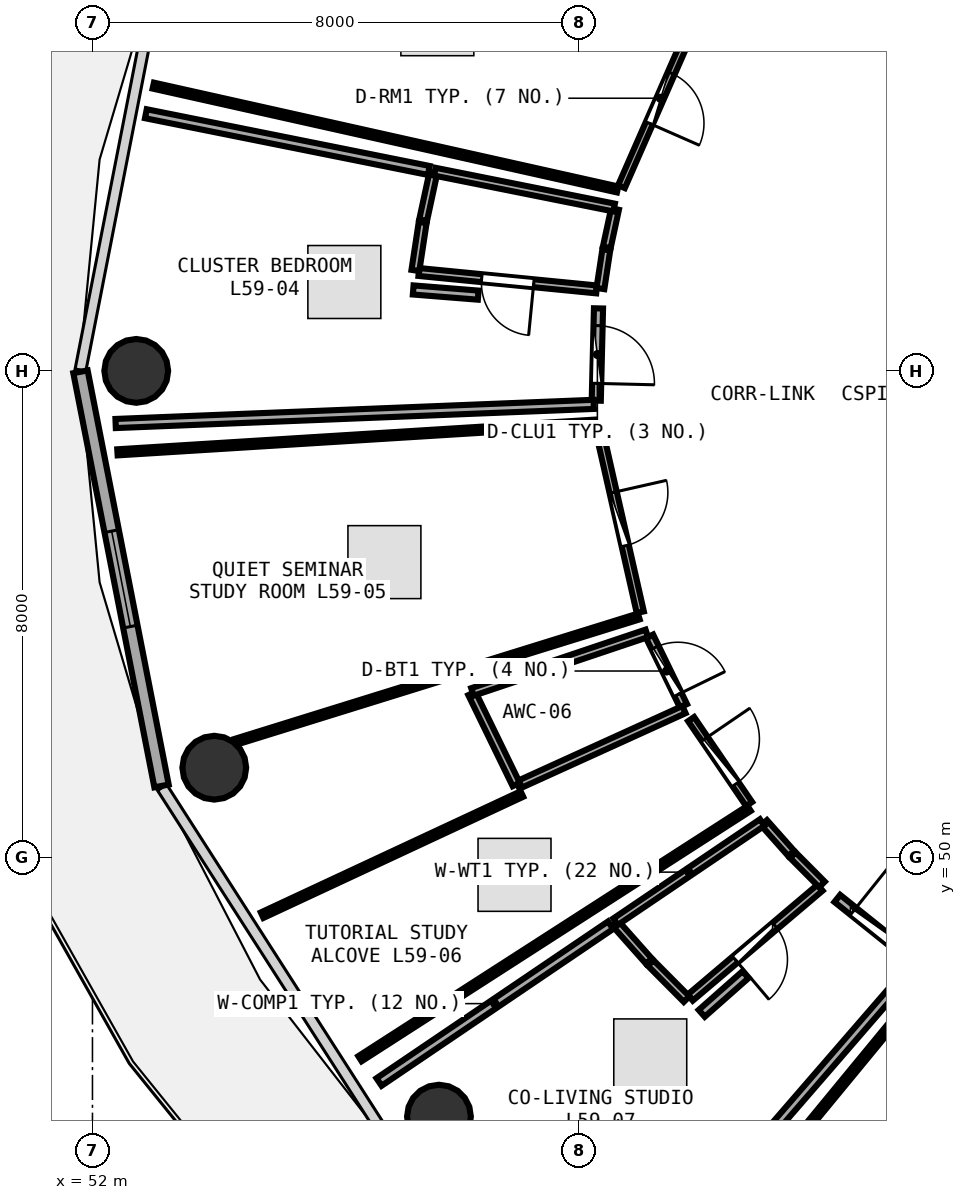
"""IFC4 building model, lengths in metres.
Left out: names, types, materials, properties, quantities, classifications, styles, units other than length and angle.
Written with IfcOpenShell. Run it as: python <this file> out.ifc"""

import sys

from ifc_helpers import new_model, si_unit, direction, frame, frame_2d, origin, origin_2d, place, context, subcontext, project, spatial, rectangle, circle, extrude, element, fill, save


model = new_model("IFC4")
c1 = context("Model", 3, precision=1e-05, world=origin(), true_north=direction((0.0, 1.0)))
c2 = subcontext(c1, "Body", "Model", "MODEL_VIEW")
j1 = project(units=[si_unit("LENGTHUNIT", "METRE"), si_unit("PLANEANGLEUNIT", "RADIAN")], contexts=[c1])
p1 = place(None, origin())
s1 = spatial("IfcSite", under=j1, at=p1, CompositionType="ELEMENT")
p2 = place(p1, origin())
s2 = spatial("IfcBuilding", under=s1, at=p2, CompositionType="ELEMENT")
p3 = place(p2, frame((0.0, 0.0, 230.7)))
s3 = spatial("IfcBuildingStorey", under=s2, at=p3, CompositionType="ELEMENT", Elevation=230.7)
for number, where, z_axis, x_axis in (
    (1, (52.72, 58.0, 0.0), (0.0, 0.0, 1.0), (1.0, 0.0, 0.0)),
    (2, (54.003, 51.474, 0.0), (0.0, 0.0, 1.0), (1.0, 0.0, 0.0)),
    (3, (57.698, 45.736, 0.0), (0.0, 0.0, 1.0), (1.0, 0.0, 0.0)),
):
    element("IfcColumn", number, at=place(p3, frame(where, z_axis=z_axis, x_axis=x_axis)), inside=s3, PredefinedType="COLUMN", context=c2, shape_type="SweptSolid", body=[
        extrude(circle(Radius=0.525, at=origin_2d()), origin(), (0.0, 0.0, 1.0), 3.75),
    ])
p4 = place(p3, frame((51.803, 57.985, 0.0), z_axis=(0.0, 0.0, 1.0), x_axis=(0.192069055673, -0.981381413036, 0.0)))
e4 = element("IfcWall", 4, at=p4, inside=s3, PredefinedType="SOLIDWALL", context=c2, shape_type="SweptSolid", body=[
    extrude(rectangle(XDim=6.94, YDim=0.24, at=frame_2d((3.47, 0.0))), origin(), (0.0, 0.0, 1.0), 3.475),
])
p5 = place(p4, frame((2.67, 0.0, 0.85)))
e5 = element("IfcOpeningElement", 5, at=p5, cuts=e4, PredefinedType="OPENING", context=c2, shape_type="SweptSolid", body=[
    extrude(rectangle(XDim=1.6, YDim=1.45, at=frame_2d((0.8, 0.725))), frame((0.0, 0.13, 0.0), z_axis=(0.0, -1.0, 0.0), x_axis=(1.0, 0.0, 0.0)), (0.0, 0.0, 1.0), 0.26),
])
p6 = place(p3, frame((61.976, 63.937, 0.0), z_axis=(0.0, 0.0, 1.0), x_axis=(-0.401802923717, -0.91572616567, 0.0)))
e6 = element("IfcWall", 6, at=p6, inside=s3, PredefinedType="PARTITIONING", context=c2, shape_type="SweptSolid", body=[
    extrude(rectangle(XDim=3.175, YDim=0.12, at=frame_2d((1.587, 0.0))), origin(), (0.0, 0.0, 1.0), 3.235),
])
p7 = place(p6, frame((1.137, 0.0, 0.0)))
e7 = element("IfcOpeningElement", 7, at=p7, cuts=e6, PredefinedType="OPENING", context=c2, shape_type="SweptSolid", body=[
    extrude(rectangle(XDim=0.9, YDim=2.08, at=frame_2d((0.45, 1.04))), frame((0.0, 0.07, 0.0), z_axis=(0.0, -1.0, 0.0), x_axis=(1.0, 0.0, 0.0)), (0.0, 0.0, 1.0), 0.14),
])
p8 = place(p3, frame((60.291, 59.34, 0.0), z_axis=(0.0, 0.0, 1.0), x_axis=(-0.995236750248, 0.097487491277, 0.0)))
e8 = element("IfcWall", 8, at=p8, inside=s3, PredefinedType="PLUMBINGWALL", context=c2, shape_type="SweptSolid", body=[
    extrude(rectangle(XDim=2.938, YDim=0.13, at=frame_2d((1.469, 0.0))), origin(), (0.0, 0.0, 1.0), 3.175),
])
p9 = place(p8, frame((1.039, 0.0, 0.0)))
e9 = element("IfcOpeningElement", 9, at=p9, cuts=e8, PredefinedType="OPENING", context=c2, shape_type="SweptSolid", body=[
    extrude(rectangle(XDim=0.86, YDim=2.05, at=frame_2d((0.43, 1.025))), frame((0.0, 0.075, 0.0), z_axis=(0.0, -1.0, 0.0), x_axis=(1.0, 0.0, 0.0)), (0.0, 0.0, 1.0), 0.15),
])
p10 = place(p3, frame((60.323, 59.028, 0.0), z_axis=(0.0, 0.0, 1.0), x_axis=(-0.024453580127, -0.999700966499, 0.0)))
e10 = element("IfcWall", 10, at=p10, inside=s3, PredefinedType="PARTITIONING", context=c2, shape_type="SweptSolid", body=[
    extrude(rectangle(XDim=1.518, YDim=0.15, at=frame_2d((0.759, 0.0))), origin(), (0.0, 0.0, 1.0), 3.025),
])
p11 = place(p10, frame((0.284, 0.0, 0.0)))
e11 = element("IfcOpeningElement", 11, at=p11, cuts=e10, PredefinedType="OPENING", context=c2, shape_type="SweptSolid", body=[
    extrude(rectangle(XDim=0.95, YDim=2.08, at=frame_2d((0.475, 1.04))), frame((0.0, 0.085, 0.0), z_axis=(0.0, -1.0, 0.0), x_axis=(1.0, 0.0, 0.0)), (0.0, 0.0, 1.0), 0.17),
])
p12 = place(p3, frame((60.316, 57.093, 0.0), z_axis=(0.0, 0.0, 1.0), x_axis=(0.22091500264, -0.975293064473, 0.0)))
e12 = element("IfcWall", 12, at=p12, inside=s3, PredefinedType="PARTITIONING", context=c2, shape_type="SweptSolid", body=[
    extrude(rectangle(XDim=3.139, YDim=0.12, at=frame_2d((1.569, 0.0))), origin(), (0.0, 0.0, 1.0), 3.48),
])
p13 = place(p12, frame((1.119, 0.0, 0.0)))
e13 = element("IfcOpeningElement", 13, at=p13, cuts=e12, PredefinedType="OPENING", context=c2, shape_type="SweptSolid", body=[
    extrude(rectangle(XDim=0.9, YDim=2.08, at=frame_2d((0.45, 1.04))), frame((0.0, 0.07, 0.0), z_axis=(0.0, -1.0, 0.0), x_axis=(1.0, 0.0, 0.0)), (0.0, 0.0, 1.0), 0.14),
])
p14 = place(p3, frame((61.162, 53.636, 0.0), z_axis=(0.0, 0.0, 1.0), x_axis=(0.437981349822, -0.898984058373, 0.0)))
e14 = element("IfcWall", 14, at=p14, inside=s3, PredefinedType="PLUMBINGWALL", context=c2, shape_type="SweptSolid", body=[
    extrude(rectangle(XDim=1.273, YDim=0.13, at=frame_2d((0.636, 0.0))), origin(), (0.0, 0.0, 1.0), 3.235),
])
p15 = place(p14, frame((0.206, 0.0, 0.0)))
e15 = element("IfcOpeningElement", 15, at=p15, cuts=e14, PredefinedType="OPENING", context=c2, shape_type="SweptSolid", body=[
    extrude(rectangle(XDim=0.86, YDim=2.05, at=frame_2d((0.43, 1.025))), frame((0.0, 0.075, 0.0), z_axis=(0.0, -1.0, 0.0), x_axis=(1.0, 0.0, 0.0)), (0.0, 0.0, 1.0), 0.15),
])
p16 = place(p3, frame((61.846, 52.273, 0.0), z_axis=(0.0, 0.0, 1.0), x_axis=(0.563860796601, -0.825869845712, 0.0)))
e16 = element("IfcWall", 16, at=p16, inside=s3, PredefinedType="PARTITIONING", context=c2, shape_type="SweptSolid", body=[
    extrude(rectangle(XDim=1.691, YDim=0.12, at=frame_2d((0.846, 0.0))), origin(), (0.0, 0.0, 1.0), 3.025),
])
p17 = place(p16, frame((0.396, 0.0, 0.0)))
e17 = element("IfcOpeningElement", 17, at=p17, cuts=e16, PredefinedType="OPENING", context=c2, shape_type="SweptSolid", body=[
    extrude(rectangle(XDim=0.9, YDim=2.08, at=frame_2d((0.45, 1.04))), frame((0.0, 0.07, 0.0), z_axis=(0.0, -1.0, 0.0), x_axis=(1.0, 0.0, 0.0)), (0.0, 0.0, 1.0), 0.14),
])
p18 = place(p3, frame((63.966, 49.501, 0.0), z_axis=(0.0, 0.0, 1.0), x_axis=(-0.763141339825, -0.646231611305, 0.0)))
e18 = element("IfcWall", 18, at=p18, inside=s3, PredefinedType="PLUMBINGWALL", context=c2, shape_type="SweptSolid", body=[
    extrude(rectangle(XDim=2.798, YDim=0.13, at=frame_2d((1.399, 0.0))), origin(), (0.0, 0.0, 1.0), 3.025),
])
p19 = place(p18, frame((0.969, 0.0, 0.0)))
e19 = element("IfcOpeningElement", 19, at=p19, cuts=e18, PredefinedType="OPENING", context=c2, shape_type="SweptSolid", body=[
    extrude(rectangle(XDim=0.86, YDim=2.05, at=frame_2d((0.43, 1.025))), frame((0.0, 0.075, 0.0), z_axis=(0.0, -1.0, 0.0), x_axis=(1.0, 0.0, 0.0)), (0.0, 0.0, 1.0), 0.15),
])
p20 = place(p3, frame((64.25, 49.324, 0.0), z_axis=(0.0, 0.0, 1.0), x_axis=(0.780560643324, -0.625080060547, 0.0)))
e20 = element("IfcWall", 20, at=p20, inside=s3, PredefinedType="PARTITIONING", context=c2, shape_type="SweptSolid", body=[
    extrude(rectangle(XDim=1.624, YDim=0.15, at=frame_2d((0.812, 0.0))), origin(), (0.0, 0.0, 1.0), 3.025),
])
p21 = place(p20, frame((0.337, 0.0, 0.0)))
e21 = element("IfcOpeningElement", 21, at=p21, cuts=e20, PredefinedType="OPENING", context=c2, shape_type="SweptSolid", body=[
    extrude(rectangle(XDim=0.95, YDim=2.08, at=frame_2d((0.475, 1.04))), frame((0.0, 0.085, 0.0), z_axis=(0.0, -1.0, 0.0), x_axis=(1.0, 0.0, 0.0)), (0.0, 0.0, 1.0), 0.17),
])
p22 = place(p3, frame((60.637, 60.984, 0.0), z_axis=(0.0, 0.0, 1.0), x_axis=(-0.97589770928, 0.218228460612, 0.0)))
e22 = element("IfcWall", 22, at=p22, inside=s3, PredefinedType="PARTITIONING", context=c2, shape_type="SweptSolid", body=[
    extrude(rectangle(XDim=7.826, YDim=0.1, at=frame_2d((3.913, 0.0))), origin(), (0.0, 0.0, 1.0), 3.075),
])
p23 = place(p3, frame((60.595, 60.663, 0.0), z_axis=(0.0, 0.0, 1.0), x_axis=(-0.211050082749, -0.977475249084, 0.0)))
e23 = element("IfcWall", 23, at=p23, inside=s3, PredefinedType="PLUMBINGWALL", context=c2, shape_type="SweptSolid", body=[
    extrude(rectangle(XDim=0.647, YDim=0.13, at=frame_2d((0.323, 0.0))), origin(), (0.0, 0.0, 1.0), 3.48),
])
p24 = place(p3, frame((60.451, 59.991, 0.0), z_axis=(0.0, 0.0, 1.0), x_axis=(-0.150321319766, -0.988637193729, 0.0)))
e24 = element("IfcWall", 24, at=p24, inside=s3, PredefinedType="PLUMBINGWALL", context=c2, shape_type="SweptSolid", body=[
    extrude(rectangle(XDim=0.645, YDim=0.13, at=frame_2d((0.322, 0.0))), origin(), (0.0, 0.0, 1.0), 3.48),
])
p25 = place(p3, frame((57.311, 59.652, 0.0), z_axis=(0.0, 0.0, 1.0), x_axis=(0.150331405734, 0.988635660114, 0.0)))
e25 = element("IfcWall", 25, at=p25, inside=s3, PredefinedType="PLUMBINGWALL", context=c2, shape_type="SweptSolid", body=[
    extrude(rectangle(XDim=0.797, YDim=0.13, at=frame_2d((0.399, 0.0))), origin(), (0.0, 0.0, 1.0), 3.48),
])
p26 = place(p3, frame((57.438, 60.479, 0.0), z_axis=(0.0, 0.0, 1.0), x_axis=(0.210843597485, 0.977519809211, 0.0)))
e26 = element("IfcWall", 26, at=p26, inside=s3, PredefinedType="PLUMBINGWALL", context=c2, shape_type="SweptSolid", body=[
    extrude(rectangle(XDim=0.799, YDim=0.13, at=frame_2d((0.399, 0.0))), origin(), (0.0, 0.0, 1.0), 3.48),
])
p27 = place(p3, frame((57.631, 61.276, 0.0), z_axis=(0.0, 0.0, 1.0), x_axis=(0.980543188147, -0.196303479793, 0.0)))
e27 = element("IfcWall", 27, at=p27, inside=s3, PredefinedType="PLUMBINGWALL", context=c2, shape_type="SweptSolid", body=[
    extrude(rectangle(XDim=3.007, YDim=0.13, at=frame_2d((1.504, 0.0))), origin(), (0.0, 0.0, 1.0), 3.175),
])
p28 = place(p3, frame((60.244, 57.449, 0.0), z_axis=(0.0, 0.0, 1.0), x_axis=(-0.999198776547, -0.040022555479, 0.0)))
e28 = element("IfcWall", 28, at=p28, inside=s3, PredefinedType="PARTITIONING", context=c2, shape_type="SweptSolid", body=[
    extrude(rectangle(XDim=7.869, YDim=0.15, at=frame_2d((3.935, 0.0))), origin(), (0.0, 0.0, 1.0), 3.075),
])
p29 = place(p3, frame((52.878, 62.229, 0.0), z_axis=(0.0, 0.0, 1.0), x_axis=(0.980491563171, -0.196561172538, 0.0)))
e29 = element("IfcWall", 29, at=p29, inside=s3, PredefinedType="PARTITIONING", context=c2, shape_type="SweptSolid", body=[
    extrude(rectangle(XDim=4.747, YDim=0.15, at=frame_2d((2.374, 0.0))), origin(), (0.0, 0.0, 1.0), 3.075),
])
p30 = place(p3, frame((57.275, 59.331, 0.0), z_axis=(0.0, 0.0, 1.0), x_axis=(0.996837682514, -0.079464675924, 0.0)))
e30 = element("IfcWall", 30, at=p30, inside=s3, PredefinedType="PARTITIONING", context=c2, shape_type="SweptSolid", body=[
    extrude(rectangle(XDim=1.072, YDim=0.15, at=frame_2d((0.536, 0.0))), origin(), (0.0, 0.0, 1.0), 3.175),
])
p31 = place(p3, frame((60.985, 53.961, 0.0), z_axis=(0.0, 0.0, 1.0), x_axis=(-0.954952218503, -0.29675960031, 0.0)))
e31 = element("IfcWall", 31, at=p31, inside=s3, PredefinedType="PARTITIONING", context=c2, shape_type="SweptSolid", body=[
    extrude(rectangle(XDim=6.946, YDim=0.1, at=frame_2d((3.473, 0.0))), origin(), (0.0, 0.0, 1.0), 3.175),
])
p32 = place(p3, frame((52.411, 56.66, 0.0), z_axis=(0.0, 0.0, 1.0), x_axis=(0.998074132124, 0.06203246557, 0.0)))
e32 = element("IfcWall", 32, at=p32, inside=s3, PredefinedType="PARTITIONING", context=c2, shape_type="SweptSolid", body=[
    extrude(rectangle(XDim=7.867, YDim=0.1, at=frame_2d((3.934, 0.0))), origin(), (0.0, 0.0, 1.0), 3.075),
])
p33 = place(p3, frame((61.728, 52.43, 0.0), z_axis=(0.0, 0.0, 1.0), x_axis=(-0.910394340166, -0.413741640874, 0.0)))
e33 = element("IfcWall", 33, at=p33, inside=s3, PredefinedType="PLUMBINGWALL", context=c2, shape_type="SweptSolid", body=[
    extrude(rectangle(XDim=3.0, YDim=0.13, at=frame_2d((1.5, 0.0))), origin(), (0.0, 0.0, 1.0), 3.025),
])
p34 = place(p3, frame((58.969, 51.198, 0.0), z_axis=(0.0, 0.0, 1.0), x_axis=(-0.437811526414, 0.899066775795, 0.0)))
e34 = element("IfcWall", 34, at=p34, inside=s3, PredefinedType="PLUMBINGWALL", context=c2, shape_type="SweptSolid", body=[
    extrude(rectangle(XDim=1.666, YDim=0.13, at=frame_2d((0.833, 0.0))), origin(), (0.0, 0.0, 1.0), 3.025),
])
p35 = place(p3, frame((58.25, 52.72, 0.0), z_axis=(0.0, 0.0, 1.0), x_axis=(0.947938024122, 0.318454867169, 0.0)))
e35 = element("IfcWall", 35, at=p35, inside=s3, PredefinedType="PLUMBINGWALL", context=c2, shape_type="SweptSolid", body=[
    extrude(rectangle(XDim=3.024, YDim=0.13, at=frame_2d((1.512, 0.0))), origin(), (0.0, 0.0, 1.0), 3.175),
])
p36 = place(p3, frame((62.799, 50.805, 0.0), z_axis=(0.0, 0.0, 1.0), x_axis=(-0.841021030646, -0.541002426992, 0.0)))
e36 = element("IfcWall", 36, at=p36, inside=s3, PredefinedType="PARTITIONING", context=c2, shape_type="SweptSolid", body=[
    extrude(rectangle(XDim=7.609, YDim=0.1, at=frame_2d((3.805, 0.0))), origin(), (0.0, 0.0, 1.0), 3.075),
])
p37 = place(p3, frame((54.79, 49.049, 0.0), z_axis=(0.0, 0.0, 1.0), x_axis=(0.906304818196, 0.422624628381, 0.0)))
e37 = element("IfcWall", 37, at=p37, inside=s3, PredefinedType="PARTITIONING", context=c2, shape_type="SweptSolid", body=[
    extrude(rectangle(XDim=4.714, YDim=0.1, at=frame_2d((2.357, 0.0))), origin(), (0.0, 0.0, 1.0), 3.075),
])
p38 = place(p3, frame((63.044, 50.569, 0.0), z_axis=(0.0, 0.0, 1.0), x_axis=(0.663846659507, -0.74786871352, 0.0)))
e38 = element("IfcWall", 38, at=p38, inside=s3, PredefinedType="PLUMBINGWALL", context=c2, shape_type="SweptSolid", body=[
    extrude(rectangle(XDim=0.674, YDim=0.13, at=frame_2d((0.337, 0.0))), origin(), (0.0, 0.0, 1.0), 3.48),
])
p39 = place(p3, frame((63.519, 50.036, 0.0), z_axis=(0.0, 0.0, 1.0), x_axis=(0.704946592253, -0.70926039088, 0.0)))
e39 = element("IfcWall", 39, at=p39, inside=s3, PredefinedType="PLUMBINGWALL", context=c2, shape_type="SweptSolid", body=[
    extrude(rectangle(XDim=0.679, YDim=0.13, at=frame_2d((0.34, 0.0))), origin(), (0.0, 0.0, 1.0), 3.025),
])
p40 = place(p3, frame((61.771, 47.668, 0.0), z_axis=(0.0, 0.0, 1.0), x_axis=(-0.704918740806, 0.709288071844, 0.0)))
e40 = element("IfcWall", 40, at=p40, inside=s3, PredefinedType="PLUMBINGWALL", context=c2, shape_type="SweptSolid", body=[
    extrude(rectangle(XDim=0.838, YDim=0.13, at=frame_2d((0.419, 0.0))), origin(), (0.0, 0.0, 1.0), 3.025),
])
p41 = place(p3, frame((61.153, 48.292, 0.0), z_axis=(0.0, 0.0, 1.0), x_axis=(-0.663963631636, 0.747764866696, 0.0)))
e41 = element("IfcWall", 41, at=p41, inside=s3, PredefinedType="PLUMBINGWALL", context=c2, shape_type="SweptSolid", body=[
    extrude(rectangle(XDim=0.833, YDim=0.13, at=frame_2d((0.417, 0.0))), origin(), (0.0, 0.0, 1.0), 3.48),
])
p42 = place(p3, frame((60.603, 48.941, 0.0), z_axis=(0.0, 0.0, 1.0), x_axis=(0.828277690913, 0.560317826538, 0.0)))
e42 = element("IfcWall", 42, at=p42, inside=s3, PredefinedType="PLUMBINGWALL", context=c2, shape_type="SweptSolid", body=[
    extrude(rectangle(XDim=2.912, YDim=0.13, at=frame_2d((1.456, 0.0))), origin(), (0.0, 0.0, 1.0), 3.235),
])
p43 = place(p3, frame((65.538, 48.242, 0.0), z_axis=(0.0, 0.0, 1.0), x_axis=(-0.654642167947, -0.755938907549, 0.0)))
e43 = element("IfcWall", 43, at=p43, inside=s3, PredefinedType="PARTITIONING", context=c2, shape_type="SweptSolid", body=[
    extrude(rectangle(XDim=7.382, YDim=0.15, at=frame_2d((3.691, 0.0))), origin(), (0.0, 0.0, 1.0), 3.025),
])
p44 = place(p3, frame((56.713, 46.305, 0.0), z_axis=(0.0, 0.0, 1.0), x_axis=(0.828059419786, 0.560640345768, 0.0)))
e44 = element("IfcWall", 44, at=p44, inside=s3, PredefinedType="PARTITIONING", context=c2, shape_type="SweptSolid", body=[
    extrude(rectangle(XDim=4.599, YDim=0.15, at=frame_2d((2.299, 0.0))), origin(), (0.0, 0.0, 1.0), 3.075),
])
p45 = place(p3, frame((62.02, 47.435, 0.0), z_axis=(0.0, 0.0, 1.0), x_axis=(0.749645272156, 0.661839834049, 0.0)))
e45 = element("IfcWall", 45, at=p45, inside=s3, PredefinedType="PARTITIONING", context=c2, shape_type="SweptSolid", body=[
    extrude(rectangle(XDim=0.962, YDim=0.15, at=frame_2d((0.481, 0.0))), origin(), (0.0, 0.0, 1.0), 3.48),
])
p46 = place(p3, frame((61.125, 42.374, 0.0), z_axis=(0.0, 0.0, 1.0), x_axis=(0.635558493253, 0.772052719478, 0.0)))
e46 = element("IfcWall", 46, at=p46, inside=s3, PredefinedType="PARTITIONING", context=c2, shape_type="SweptSolid", body=[
    extrude(rectangle(XDim=7.364, YDim=0.1, at=frame_2d((3.682, 0.0))), origin(), (0.0, 0.0, 1.0), 3.025),
])
p47 = place(p5, origin())
e47 = element("IfcWindow", 47, at=p47, inside=s3, PartitioningType="SINGLE_PANEL", PredefinedType="WINDOW", context=c2, shape_type="SweptSolid", body=[
    extrude(rectangle(XDim=1.6, YDim=1.45, at=frame_2d((0.8, 0.725))), frame((0.0, 0.03, 0.0), z_axis=(0.0, -1.0, 0.0), x_axis=(1.0, 0.0, 0.0)), (0.0, 0.0, 1.0), 0.06),
])
fill(e5, e47)
p48 = place(p7, origin())
e48 = element("IfcDoor", 48, at=p48, inside=s3, OperationType="SINGLE_SWING_RIGHT", PredefinedType="DOOR", context=c2, shape_type="SweptSolid", body=[
    extrude(rectangle(XDim=0.9, YDim=2.08, at=frame_2d((0.45, 1.04))), frame((0.0, 0.025, 0.0), z_axis=(0.0, -1.0, 0.0), x_axis=(1.0, 0.0, 0.0)), (0.0, 0.0, 1.0), 0.05),
])
fill(e7, e48)
p49 = place(p9, origin())
e49 = element("IfcDoor", 49, at=p49, inside=s3, OperationType="SINGLE_SWING_LEFT", PredefinedType="DOOR", context=c2, shape_type="SweptSolid", body=[
    extrude(rectangle(XDim=0.86, YDim=2.05, at=frame_2d((0.43, 1.025))), frame((0.0, 0.025, 0.0), z_axis=(0.0, -1.0, 0.0), x_axis=(1.0, 0.0, 0.0)), (0.0, 0.0, 1.0), 0.05),
])
fill(e9, e49)
p50 = place(p11, origin())
e50 = element("IfcDoor", 50, at=p50, inside=s3, OperationType="SINGLE_SWING_RIGHT", PredefinedType="DOOR", context=c2, shape_type="SweptSolid", body=[
    extrude(rectangle(XDim=0.95, YDim=2.08, at=frame_2d((0.475, 1.04))), frame((0.0, 0.025, 0.0), z_axis=(0.0, -1.0, 0.0), x_axis=(1.0, 0.0, 0.0)), (0.0, 0.0, 1.0), 0.05),
])
fill(e11, e50)
p51 = place(p13, origin())
e51 = element("IfcDoor", 51, at=p51, inside=s3, OperationType="SINGLE_SWING_LEFT", PredefinedType="DOOR", context=c2, shape_type="SweptSolid", body=[
    extrude(rectangle(XDim=0.9, YDim=2.08, at=frame_2d((0.45, 1.04))), frame((0.0, 0.025, 0.0), z_axis=(0.0, -1.0, 0.0), x_axis=(1.0, 0.0, 0.0)), (0.0, 0.0, 1.0), 0.05),
])
fill(e13, e51)
p52 = place(p15, origin())
e52 = element("IfcDoor", 52, at=p52, inside=s3, OperationType="SINGLE_SWING_RIGHT", PredefinedType="DOOR", context=c2, shape_type="SweptSolid", body=[
    extrude(rectangle(XDim=0.86, YDim=2.05, at=frame_2d((0.43, 1.025))), frame((0.0, 0.025, 0.0), z_axis=(0.0, -1.0, 0.0), x_axis=(1.0, 0.0, 0.0)), (0.0, 0.0, 1.0), 0.05),
])
fill(e15, e52)
p53 = place(p17, origin())
e53 = element("IfcDoor", 53, at=p53, inside=s3, OperationType="SINGLE_SWING_LEFT", PredefinedType="DOOR", context=c2, shape_type="SweptSolid", body=[
    extrude(rectangle(XDim=0.9, YDim=2.08, at=frame_2d((0.45, 1.04))), frame((0.0, 0.025, 0.0), z_axis=(0.0, -1.0, 0.0), x_axis=(1.0, 0.0, 0.0)), (0.0, 0.0, 1.0), 0.05),
])
fill(e17, e53)
p54 = place(p19, origin())
e54 = element("IfcDoor", 54, at=p54, inside=s3, OperationType="SINGLE_SWING_RIGHT", PredefinedType="DOOR", context=c2, shape_type="SweptSolid", body=[
    extrude(rectangle(XDim=0.86, YDim=2.05, at=frame_2d((0.43, 1.025))), frame((0.0, 0.025, 0.0), z_axis=(0.0, -1.0, 0.0), x_axis=(1.0, 0.0, 0.0)), (0.0, 0.0, 1.0), 0.05),
])
fill(e19, e54)
p55 = place(p21, origin())
e55 = element("IfcDoor", 55, at=p55, inside=s3, OperationType="SINGLE_SWING_LEFT", PredefinedType="DOOR", context=c2, shape_type="SweptSolid", body=[
    extrude(rectangle(XDim=0.95, YDim=2.08, at=frame_2d((0.475, 1.04))), frame((0.0, 0.025, 0.0), z_axis=(0.0, -1.0, 0.0), x_axis=(1.0, 0.0, 0.0)), (0.0, 0.0, 1.0), 0.05),
])
fill(e21, e55)
save(model, sys.argv[1])
